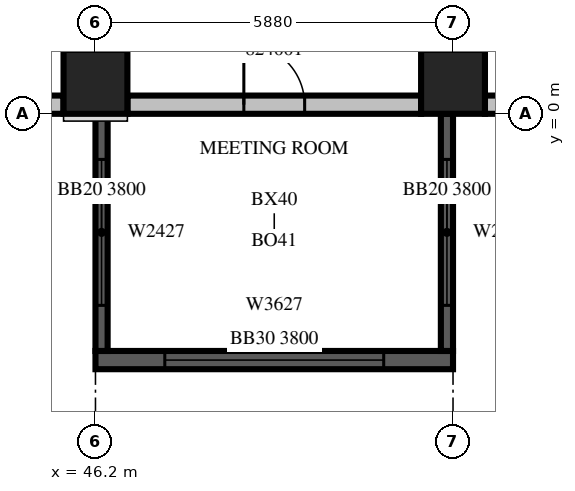
"""IFC4 building model, lengths in metres.
Left out: names, types, materials, properties, quantities, classifications, styles, units other than length and angle.
Written with IfcOpenShell. Run it as: python <this file> out.ifc"""

import sys

from ifc_helpers import new_model, si_unit, direction, frame, frame_2d, origin, origin_2d, place, context, subcontext, project, spatial, rectangle, extrude, source, transform, mapped, element, fill, save


model = new_model("IFC4")
c1 = context("Model", 3, precision=1e-05, world=origin(), true_north=direction((0.0, 1.0)))
c2 = subcontext(c1, "Body", "Model", "MODEL_VIEW")
j1 = project(units=[si_unit("LENGTHUNIT", "METRE"), si_unit("PLANEANGLEUNIT", "RADIAN")], contexts=[c1])
p1 = place(None, origin())
s1 = spatial("IfcSite", under=j1, at=p1, CompositionType="ELEMENT")
p2 = place(p1, origin())
s2 = spatial("IfcBuilding", under=s1, at=p2, CompositionType="ELEMENT")
p3 = place(p2, frame((0.0, 0.0, 111.9)))
s3 = spatial("IfcBuildingStorey", under=s2, at=p3, CompositionType="ELEMENT", Elevation=111.9)
m1 = source(origin(), c2, "Body", "SweptSolid", [
    extrude(rectangle(XDim=1.05, YDim=1.05, at=origin_2d()), origin(), (0.0, 0.0, 1.0), 4.2),
])
for number, where, z_axis, x_axis in (
    (1, (46.2, 0.525, 0.0), (0.0, 0.0, 1.0), (1.0, 0.0, 0.0)),
    (2, (52.08, 0.525, 0.0), (0.0, 0.0, 1.0), (1.0, 0.0, 0.0)),
):
    element("IfcColumn", number, at=place(p3, frame(where, z_axis=z_axis, x_axis=x_axis)), inside=s3, PredefinedType="COLUMN", context=c2, shape_type="MappedRepresentation", body=[
        mapped(m1, transform((0.0, 0.0, 0.0), scale=1.0)),
    ])
m2 = source(origin(), c2, "Body", "SweptSolid", [
    extrude(rectangle(XDim=5.88, YDim=0.3, at=frame_2d((2.94, 0.0))), origin(), (0.0, 0.0, 1.0), 3.8),
])
p4 = place(p3, frame((46.2, -4.05, 0.0), z_axis=(0.0, 0.0, 1.0), x_axis=(1.0, 0.0, 0.0)))
e3 = element("IfcWall", 3, at=p4, inside=s3, PredefinedType="SOLIDWALL", context=c2, shape_type="MappedRepresentation", body=[
    mapped(m2, transform((0.0, 0.0, 0.0), scale=1.0)),
])
m3 = source(origin(), c2, "Body", "SweptSolid", [
    extrude(rectangle(XDim=3.6, YDim=2.7, at=frame_2d((1.8, 1.35))), frame((0.0, 0.16, 0.0), z_axis=(0.0, -1.0, 0.0), x_axis=(1.0, 0.0, 0.0)), (0.0, 0.0, 1.0), 0.32),
])
p5 = place(p4, frame((1.14, 0.0, 0.6)))
e4 = element("IfcOpeningElement", 4, at=p5, cuts=e3, PredefinedType="OPENING", context=c2, shape_type="MappedRepresentation", body=[
    mapped(m3, transform((0.0, 0.0, 0.0), scale=1.0)),
])
m4 = source(origin(), c2, "Body", "SweptSolid", [
    extrude(rectangle(XDim=3.9, YDim=0.2, at=frame_2d((1.95, 0.0))), origin(), (0.0, 0.0, 1.0), 3.8),
])
p6 = place(p3, frame((46.3, 0.0, 0.0), z_axis=(0.0, 0.0, 1.0), x_axis=(0.0, -1.0, 0.0)))
e5 = element("IfcWall", 5, at=p6, inside=s3, PredefinedType="SOLIDWALL", context=c2, shape_type="MappedRepresentation", body=[
    mapped(m4, transform((0.0, 0.0, 0.0), scale=1.0)),
])
m5 = source(origin(), c2, "Body", "SweptSolid", [
    extrude(rectangle(XDim=2.4, YDim=2.7, at=frame_2d((1.2, 1.35))), frame((0.0, 0.11, 0.0), z_axis=(0.0, -1.0, 0.0), x_axis=(1.0, 0.0, 0.0)), (0.0, 0.0, 1.0), 0.22),
])
p7 = place(p6, frame((0.75, 0.0, 0.6)))
e6 = element("IfcOpeningElement", 6, at=p7, cuts=e5, PredefinedType="OPENING", context=c2, shape_type="MappedRepresentation", body=[
    mapped(m5, transform((0.0, 0.0, 0.0), scale=1.0)),
])
p8 = place(p3, frame((51.98, 0.0, 0.0), z_axis=(0.0, 0.0, 1.0), x_axis=(0.0, -1.0, 0.0)))
e7 = element("IfcWall", 7, at=p8, inside=s3, PredefinedType="SOLIDWALL", context=c2, shape_type="MappedRepresentation", body=[
    mapped(m4, transform((0.0, 0.0, 0.0), scale=1.0)),
])
p9 = place(p8, frame((0.75, 0.0, 0.6)))
e8 = element("IfcOpeningElement", 8, at=p9, cuts=e7, PredefinedType="OPENING", context=c2, shape_type="MappedRepresentation", body=[
    mapped(m5, transform((0.0, 0.0, 0.0), scale=1.0)),
])
m6 = source(origin(), c2, "Body", "SweptSolid", [
    extrude(rectangle(XDim=1.675, YDim=0.3, at=frame_2d((0.838, 0.0))), origin(), (0.0, 0.0, 1.0), 3.8),
])
p10 = place(p3, frame((44.0, 0.15, 0.0), z_axis=(0.0, 0.0, 1.0), x_axis=(1.0, 0.0, 0.0)))
e9 = element("IfcWall", 9, at=p10, inside=s3, PredefinedType="STANDARD", context=c2, shape_type="MappedRepresentation", body=[
    mapped(m6, transform((0.0, 0.0, 0.0), scale=1.0)),
])
m7 = source(origin(), c2, "Body", "SweptSolid", [
    extrude(rectangle(XDim=0.9, YDim=2.7, at=frame_2d((0.45, 1.35))), frame((0.0, 0.16, 0.0), z_axis=(0.0, -1.0, 0.0), x_axis=(1.0, 0.0, 0.0)), (0.0, 0.0, 1.0), 0.32),
])
p11 = place(p10, frame((0.388, 0.0, 0.6)))
e10 = element("IfcOpeningElement", 10, at=p11, cuts=e9, PredefinedType="OPENING", context=c2, shape_type="MappedRepresentation", body=[
    mapped(m7, transform((0.0, 0.0, 0.0), scale=1.0)),
])
m8 = source(origin(), c2, "Body", "SweptSolid", [
    extrude(rectangle(XDim=4.83, YDim=0.3, at=frame_2d((2.415, 0.0))), origin(), (0.0, 0.0, 1.0), 3.8),
])
p12 = place(p3, frame((46.725, 0.15, 0.0), z_axis=(0.0, 0.0, 1.0), x_axis=(1.0, 0.0, 0.0)))
e11 = element("IfcWall", 11, at=p12, inside=s3, PredefinedType="STANDARD", context=c2, shape_type="MappedRepresentation", body=[
    mapped(m8, transform((0.0, 0.0, 0.0), scale=1.0)),
])
m9 = source(origin(), c2, "Body", "SweptSolid", [
    extrude(rectangle(XDim=1.0, YDim=2.1, at=frame_2d((0.5, 1.05))), frame((0.0, 0.16, 0.0), z_axis=(0.0, -1.0, 0.0), x_axis=(1.0, 0.0, 0.0)), (0.0, 0.0, 1.0), 0.32),
])
p13 = place(p12, frame((1.915, 0.0, 0.0)))
e12 = element("IfcOpeningElement", 12, at=p13, cuts=e11, PredefinedType="OPENING", context=c2, shape_type="MappedRepresentation", body=[
    mapped(m9, transform((0.0, 0.0, 0.0), scale=1.0)),
])
p14 = place(p3, frame((52.605, 0.15, 0.0), z_axis=(0.0, 0.0, 1.0), x_axis=(1.0, 0.0, 0.0)))
e13 = element("IfcWall", 13, at=p14, inside=s3, PredefinedType="STANDARD", context=c2, shape_type="MappedRepresentation", body=[
    mapped(m8, transform((0.0, 0.0, 0.0), scale=1.0)),
])
p15 = place(p14, frame((0.615, 0.0, 0.6)))
e14 = element("IfcOpeningElement", 14, at=p15, cuts=e13, PredefinedType="OPENING", context=c2, shape_type="MappedRepresentation", body=[
    mapped(m3, transform((0.0, 0.0, 0.0), scale=1.0)),
])
m10 = source(origin(), c2, "Body", "SweptSolid", [
    extrude(rectangle(XDim=3.6, YDim=2.7, at=frame_2d((1.8, 1.35))), frame((0.0, 0.03, 0.0), z_axis=(0.0, -1.0, 0.0), x_axis=(1.0, 0.0, 0.0)), (0.0, 0.0, 1.0), 0.06),
])
p16 = place(p5, origin())
e15 = element("IfcWindow", 15, at=p16, inside=s3, PartitioningType="SINGLE_PANEL", PredefinedType="WINDOW", context=c2, shape_type="MappedRepresentation", body=[
    mapped(m10, transform((0.0, 0.0, 0.0), scale=1.0)),
])
fill(e4, e15)
m11 = source(origin(), c2, "Body", "SweptSolid", [
    extrude(rectangle(XDim=2.4, YDim=2.7, at=frame_2d((1.2, 1.35))), frame((0.0, 0.03, 0.0), z_axis=(0.0, -1.0, 0.0), x_axis=(1.0, 0.0, 0.0)), (0.0, 0.0, 1.0), 0.06),
])
p17 = place(p7, origin())
e16 = element("IfcWindow", 16, at=p17, inside=s3, PartitioningType="SINGLE_PANEL", PredefinedType="WINDOW", context=c2, shape_type="MappedRepresentation", body=[
    mapped(m11, transform((0.0, 0.0, 0.0), scale=1.0)),
])
fill(e6, e16)
p18 = place(p9, origin())
e17 = element("IfcWindow", 17, at=p18, inside=s3, PartitioningType="SINGLE_PANEL", PredefinedType="WINDOW", context=c2, shape_type="MappedRepresentation", body=[
    mapped(m11, transform((0.0, 0.0, 0.0), scale=1.0)),
])
fill(e8, e17)
m12 = source(origin(), c2, "Body", "SweptSolid", [
    extrude(rectangle(XDim=1.0, YDim=2.1, at=frame_2d((0.5, 1.05))), frame((0.0, 0.025, 0.0), z_axis=(0.0, -1.0, 0.0), x_axis=(1.0, 0.0, 0.0)), (0.0, 0.0, 1.0), 0.05),
])
p19 = place(p13, origin())
e18 = element("IfcDoor", 18, at=p19, inside=s3, OperationType="SINGLE_SWING_LEFT", PredefinedType="DOOR", context=c2, shape_type="MappedRepresentation", body=[
    mapped(m12, transform((0.0, 0.0, 0.0), scale=1.0)),
])
fill(e12, e18)
save(model, sys.argv[1])
